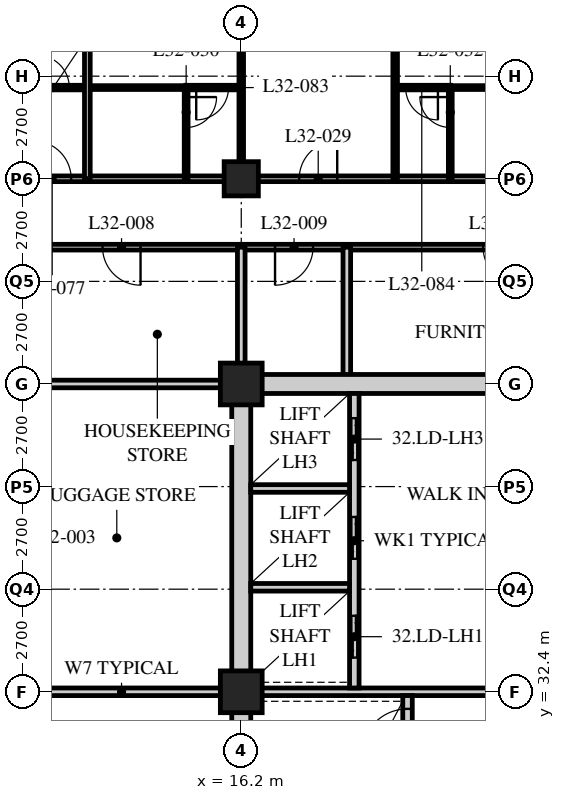
"""IFC4 building model, lengths in metres.
Left out: names, types, materials, properties, quantities, classifications, styles, units other than length and angle.
Written with IfcOpenShell. Run it as: python <this file> out.ifc"""

import sys

from ifc_helpers import new_model, si_unit, direction, frame, frame_2d, origin, origin_2d, place, context, subcontext, project, spatial, rectangle, hollow_rectangle, extrude, element, fill, save


model = new_model("IFC4")
c1 = context("Model", 3, precision=1e-05, world=origin(), true_north=direction((0.0, 1.0)))
c2 = subcontext(c1, "Body", "Model", "MODEL_VIEW")
j1 = project(units=[si_unit("LENGTHUNIT", "METRE"), si_unit("PLANEANGLEUNIT", "RADIAN")], contexts=[c1])
p1 = place(None, origin())
s1 = spatial("IfcSite", under=j1, at=p1, CompositionType="ELEMENT")
p2 = place(p1, origin())
s2 = spatial("IfcBuilding", under=s1, at=p2, CompositionType="ELEMENT")
p3 = place(p2, frame((0.0, 0.0, 127.2)))
s3 = spatial("IfcBuildingStorey", under=s2, at=p3, CompositionType="ELEMENT", Elevation=127.2)
for number, where, z_axis, x_axis in (
    (1, (16.2, 32.4, 0.0), (0.0, 0.0, 1.0), (1.0, 0.0, 0.0)),
    (2, (16.2, 40.5, 0.0), (0.0, 0.0, 1.0), (1.0, 0.0, 0.0)),
):
    element("IfcColumn", number, at=place(p3, frame(where, z_axis=z_axis, x_axis=x_axis)), inside=s3, PredefinedType="COLUMN", context=c2, shape_type="SweptSolid", body=[
        extrude(hollow_rectangle(XDim=1.1, YDim=1.1, WallThickness=0.1, at=origin_2d()), origin(), (0.0, 0.0, 1.0), 3.4),
    ])
p4 = place(p3, frame((16.2, 45.9, 0.0), z_axis=(0.0, 0.0, 1.0), x_axis=(1.0, 0.0, 0.0)))
e3 = element("IfcColumn", 3, at=p4, inside=s3, PredefinedType="COLUMN", context=c2, shape_type="SweptSolid", body=[
    extrude(hollow_rectangle(XDim=0.9, YDim=0.9, WallThickness=0.09, at=origin_2d()), origin(), (0.0, 0.0, 1.0), 3.4),
])
p5 = place(p3, frame((8.1, 45.9, 0.0), z_axis=(0.0, 0.0, 1.0), x_axis=(1.0, 0.0, 0.0)))
e4 = element("IfcWall", 4, at=p5, inside=s3, PredefinedType="PARTITIONING", context=c2, shape_type="SweptSolid", body=[
    extrude(rectangle(XDim=40.5, YDim=0.15, at=frame_2d((20.25, 0.0))), origin(), (0.0, 0.0, 1.0), 2.578),
])
p6 = place(p5, frame((9.625, 0.0, 0.0)))
e5 = element("IfcOpeningElement", 5, at=p6, cuts=e4, PredefinedType="OPENING", context=c2, shape_type="SweptSolid", body=[
    extrude(rectangle(XDim=1.0, YDim=2.1, at=frame_2d((0.5, 1.05))), frame((0.0, 0.085, 0.0), z_axis=(0.0, -1.0, 0.0), x_axis=(1.0, 0.0, 0.0)), (0.0, 0.0, 1.0), 0.17),
])
p7 = place(p5, frame((21.65, 0.0, 0.0)))
e6 = element("IfcOpeningElement", 6, at=p7, cuts=e4, PredefinedType="OPENING", context=c2, shape_type="SweptSolid", body=[
    extrude(rectangle(XDim=1.0, YDim=2.1, at=frame_2d((0.5, 1.05))), frame((0.0, 0.085, 0.0), z_axis=(0.0, -1.0, 0.0), x_axis=(1.0, 0.0, 0.0)), (0.0, 0.0, 1.0), 0.17),
])
p8 = place(p5, frame((26.75, 0.0, 0.0)))
e7 = element("IfcOpeningElement", 7, at=p8, cuts=e4, PredefinedType="OPENING", context=c2, shape_type="SweptSolid", body=[
    extrude(rectangle(XDim=1.0, YDim=2.1, at=frame_2d((0.5, 1.05))), frame((0.0, 0.085, 0.0), z_axis=(0.0, -1.0, 0.0), x_axis=(1.0, 0.0, 0.0)), (0.0, 0.0, 1.0), 0.17),
])
p9 = place(p5, frame((28.95, 0.0, 0.0)))
e8 = element("IfcOpeningElement", 8, at=p9, cuts=e4, PredefinedType="OPENING", context=c2, shape_type="SweptSolid", body=[
    extrude(rectangle(XDim=1.0, YDim=2.1, at=frame_2d((0.5, 1.05))), frame((0.0, 0.085, 0.0), z_axis=(0.0, -1.0, 0.0), x_axis=(1.0, 0.0, 0.0)), (0.0, 0.0, 1.0), 0.17),
])
p10 = place(p5, frame((34.85, 0.0, 0.0)))
e9 = element("IfcOpeningElement", 9, at=p10, cuts=e4, PredefinedType="OPENING", context=c2, shape_type="SweptSolid", body=[
    extrude(rectangle(XDim=1.0, YDim=2.1, at=frame_2d((0.5, 1.05))), frame((0.0, 0.085, 0.0), z_axis=(0.0, -1.0, 0.0), x_axis=(1.0, 0.0, 0.0)), (0.0, 0.0, 1.0), 0.17),
])
p11 = place(p5, frame((36.875, 0.0, 0.0)))
e10 = element("IfcOpeningElement", 10, at=p11, cuts=e4, PredefinedType="OPENING", context=c2, shape_type="SweptSolid", body=[
    extrude(rectangle(XDim=1.0, YDim=2.1, at=frame_2d((0.5, 1.05))), frame((0.0, 0.085, 0.0), z_axis=(0.0, -1.0, 0.0), x_axis=(1.0, 0.0, 0.0)), (0.0, 0.0, 1.0), 0.17),
])
p12 = place(p5, frame((2.625, 0.0, 0.0)))
e11 = element("IfcOpeningElement", 11, at=p12, cuts=e4, PredefinedType="OPENING", context=c2, shape_type="SweptSolid", body=[
    extrude(rectangle(XDim=1.0, YDim=2.1, at=frame_2d((0.5, 1.05))), frame((0.0, 0.085, 0.0), z_axis=(0.0, -1.0, 0.0), x_axis=(1.0, 0.0, 0.0)), (0.0, 0.0, 1.0), 0.17),
])
p13 = place(p3, frame((27.14, 44.1, 0.0), z_axis=(0.0, 0.0, 1.0), x_axis=(-1.0, 0.0, 0.0)))
e12 = element("IfcWall", 12, at=p13, inside=s3, PredefinedType="PARTITIONING", context=c2, shape_type="SweptSolid", body=[
    extrude(rectangle(XDim=17.24, YDim=0.15, at=frame_2d((8.62, 0.0))), origin(), (0.0, 0.0, 1.0), 3.19),
])
p14 = place(p13, frame((13.59, 0.0, 0.0)))
e13 = element("IfcOpeningElement", 13, at=p14, cuts=e12, PredefinedType="OPENING", context=c2, shape_type="SweptSolid", body=[
    extrude(rectangle(XDim=1.0, YDim=2.1, at=frame_2d((0.5, 1.05))), frame((0.0, 0.085, 0.0), z_axis=(0.0, -1.0, 0.0), x_axis=(1.0, 0.0, 0.0)), (0.0, 0.0, 1.0), 0.17),
])
p15 = place(p13, frame((9.051, 0.0, 0.0)))
e14 = element("IfcOpeningElement", 14, at=p15, cuts=e12, PredefinedType="OPENING", context=c2, shape_type="SweptSolid", body=[
    extrude(rectangle(XDim=1.0, YDim=2.1, at=frame_2d((0.5, 1.05))), frame((0.0, 0.085, 0.0), z_axis=(0.0, -1.0, 0.0), x_axis=(1.0, 0.0, 0.0)), (0.0, 0.0, 1.0), 0.17),
])
p16 = place(p13, frame((3.576, 0.0, 0.0)))
e15 = element("IfcOpeningElement", 15, at=p16, cuts=e12, PredefinedType="OPENING", context=c2, shape_type="SweptSolid", body=[
    extrude(rectangle(XDim=1.0, YDim=2.1, at=frame_2d((0.5, 1.05))), frame((0.0, 0.085, 0.0), z_axis=(0.0, -1.0, 0.0), x_axis=(1.0, 0.0, 0.0)), (0.0, 0.0, 1.0), 0.17),
])
p17 = place(p3, frame((9.9, 32.4, 0.0), z_axis=(0.0, 0.0, 1.0), x_axis=(1.0, 0.0, 0.0)))
e16 = element("IfcWall", 16, at=p17, inside=s3, PredefinedType="SOLIDWALL", context=c2, shape_type="SweptSolid", body=[
    extrude(rectangle(XDim=6.3, YDim=0.2, at=frame_2d((3.15, 0.0))), origin(), (0.0, 0.0, 1.0), 3.19),
])
p18 = place(p3, frame((16.2, 40.5, 0.0), z_axis=(0.0, 0.0, 1.0), x_axis=(0.0, 1.0, 0.0)))
e17 = element("IfcWall", 17, at=p18, inside=s3, PredefinedType="SOLIDWALL", context=c2, shape_type="SweptSolid", body=[
    extrude(rectangle(XDim=3.6, YDim=0.2, at=frame_2d((1.8, 0.0))), origin(), (0.0, 0.0, 1.0), 2.578),
])
p19 = place(p3, frame((18.978, 44.1, 0.0), z_axis=(0.0, 0.0, 1.0), x_axis=(0.0, -1.0, 0.0)))
e18 = element("IfcWall", 18, at=p19, inside=s3, PredefinedType="SOLIDWALL", context=c2, shape_type="SweptSolid", body=[
    extrude(rectangle(XDim=3.6, YDim=0.2, at=frame_2d((1.8, 0.0))), origin(), (0.0, 0.0, 1.0), 3.19),
])
p20 = place(p3, frame((9.9, 40.5, 0.0), z_axis=(0.0, 0.0, 1.0), x_axis=(1.0, 0.0, 0.0)))
e19 = element("IfcWall", 19, at=p20, inside=s3, PredefinedType="SOLIDWALL", context=c2, shape_type="SweptSolid", body=[
    extrude(rectangle(XDim=6.3, YDim=0.2, at=frame_2d((3.15, 0.0))), origin(), (0.0, 0.0, 1.0), 3.19),
])
p21 = place(p3, frame((12.15, 48.3, 0.0), z_axis=(0.0, 0.0, 1.0), x_axis=(1.0, 0.0, 0.0)))
e20 = element("IfcWall", 20, at=p21, inside=s3, PredefinedType="PARTITIONING", context=c2, shape_type="SweptSolid", body=[
    extrude(rectangle(XDim=2.6, YDim=0.1, at=frame_2d((1.3, 0.0))), origin(), (0.0, 0.0, 1.0), 3.19),
])
p22 = place(p3, frame((14.75, 45.9, 0.0), z_axis=(0.0, 0.0, 1.0), x_axis=(0.0, 1.0, 0.0)))
e21 = element("IfcWall", 21, at=p22, inside=s3, PredefinedType="PARTITIONING", context=c2, shape_type="SweptSolid", body=[
    extrude(rectangle(XDim=2.4, YDim=0.1, at=frame_2d((1.2, 0.0))), origin(), (0.0, 0.0, 1.0), 3.19),
])
p23 = place(p22, frame((1.35, 0.0, 0.0)))
e22 = element("IfcOpeningElement", 22, at=p23, cuts=e21, PredefinedType="OPENING", context=c2, shape_type="SweptSolid", body=[
    extrude(rectangle(XDim=0.8, YDim=2.1, at=frame_2d((0.4, 1.05))), frame((0.0, 0.06, 0.0), z_axis=(0.0, -1.0, 0.0), x_axis=(1.0, 0.0, 0.0)), (0.0, 0.0, 1.0), 0.12),
])
p24 = place(p3, frame((16.2, 45.9, 0.0), z_axis=(0.0, 0.0, 1.0), x_axis=(0.0, 1.0, 0.0)))
e23 = element("IfcWall", 23, at=p24, inside=s3, PredefinedType="PARTITIONING", context=c2, shape_type="SweptSolid", body=[
    extrude(rectangle(XDim=7.8, YDim=0.12, at=frame_2d((3.9, 0.0))), origin(), (0.0, 0.0, 1.0), 2.578),
])
p25 = place(p24, frame((4.825, 0.0, 0.0)))
e24 = element("IfcOpeningElement", 24, at=p25, cuts=e23, PredefinedType="OPENING", context=c2, shape_type="SweptSolid", body=[
    extrude(rectangle(XDim=0.85, YDim=2.1, at=frame_2d((0.425, 1.05))), frame((0.0, 0.07, 0.0), z_axis=(0.0, -1.0, 0.0), x_axis=(1.0, 0.0, 0.0)), (0.0, 0.0, 1.0), 0.14),
])
p26 = place(p3, frame((21.7, 48.3, 0.0), z_axis=(0.0, 0.0, 1.0), x_axis=(1.0, 0.0, 0.0)))
e25 = element("IfcWall", 25, at=p26, inside=s3, PredefinedType="PARTITIONING", context=c2, shape_type="SweptSolid", body=[
    extrude(rectangle(XDim=7.8, YDim=0.1, at=frame_2d((3.9, 0.0))), origin(), (0.0, 0.0, 1.0), 3.19),
])
p27 = place(p26, frame((3.9, 0.0, 0.0)))
e26 = element("IfcOpeningElement", 26, at=p27, cuts=e25, PredefinedType="OPENING", context=c2, shape_type="SweptSolid", body=[
    extrude(rectangle(XDim=0.8, YDim=2.1, at=frame_2d((0.4, 1.05))), frame((0.0, 0.06, 0.0), z_axis=(0.0, -1.0, 0.0), x_axis=(1.0, 0.0, 0.0)), (0.0, 0.0, 1.0), 0.12),
])
p28 = place(p26, frame((6.5, 0.0, 0.0)))
e27 = element("IfcOpeningElement", 27, at=p28, cuts=e25, PredefinedType="OPENING", context=c2, shape_type="SweptSolid", body=[
    extrude(rectangle(XDim=0.8, YDim=2.1, at=frame_2d((0.4, 1.05))), frame((0.0, 0.06, 0.0), z_axis=(0.0, -1.0, 0.0), x_axis=(1.0, 0.0, 0.0)), (0.0, 0.0, 1.0), 0.12),
])
p29 = place(p3, frame((21.7, 45.9, 0.0), z_axis=(0.0, 0.0, 1.0), x_axis=(0.0, 1.0, 0.0)))
e28 = element("IfcWall", 28, at=p29, inside=s3, PredefinedType="PARTITIONING", context=c2, shape_type="SweptSolid", body=[
    extrude(rectangle(XDim=2.4, YDim=0.1, at=frame_2d((1.2, 0.0))), origin(), (0.0, 0.0, 1.0), 3.19),
])
p30 = place(p29, frame((1.35, 0.0, 0.0)))
e29 = element("IfcOpeningElement", 29, at=p30, cuts=e28, PredefinedType="OPENING", context=c2, shape_type="SweptSolid", body=[
    extrude(rectangle(XDim=0.8, YDim=2.1, at=frame_2d((0.4, 1.05))), frame((0.0, 0.06, 0.0), z_axis=(0.0, -1.0, 0.0), x_axis=(1.0, 0.0, 0.0)), (0.0, 0.0, 1.0), 0.12),
])
p31 = place(p3, frame((20.25, 45.9, 0.0), z_axis=(0.0, 0.0, 1.0), x_axis=(0.0, 1.0, 0.0)))
e30 = element("IfcWall", 30, at=p31, inside=s3, PredefinedType="PARTITIONING", context=c2, shape_type="SweptSolid", body=[
    extrude(rectangle(XDim=7.8, YDim=0.12, at=frame_2d((3.9, 0.0))), origin(), (0.0, 0.0, 1.0), 3.19),
])
p32 = place(p31, frame((4.825, 0.0, 0.0)))
e31 = element("IfcOpeningElement", 31, at=p32, cuts=e30, PredefinedType="OPENING", context=c2, shape_type="SweptSolid", body=[
    extrude(rectangle(XDim=0.85, YDim=2.1, at=frame_2d((0.425, 1.05))), frame((0.0, 0.07, 0.0), z_axis=(0.0, -1.0, 0.0), x_axis=(1.0, 0.0, 0.0)), (0.0, 0.0, 1.0), 0.14),
])
p33 = place(p3, frame((8.1, 48.3, 0.0), z_axis=(0.0, 0.0, 1.0), x_axis=(1.0, 0.0, 0.0)))
e32 = element("IfcWall", 32, at=p33, inside=s3, PredefinedType="PARTITIONING", context=c2, shape_type="SweptSolid", body=[
    extrude(rectangle(XDim=4.05, YDim=0.12, at=frame_2d((2.025, 0.0))), origin(), (0.0, 0.0, 1.0), 3.19),
])
p34 = place(p33, frame((2.725, 0.0, 0.0)))
e33 = element("IfcOpeningElement", 33, at=p34, cuts=e32, PredefinedType="OPENING", context=c2, shape_type="SweptSolid", body=[
    extrude(rectangle(XDim=0.85, YDim=2.1, at=frame_2d((0.425, 1.05))), frame((0.0, 0.07, 0.0), z_axis=(0.0, -1.0, 0.0), x_axis=(1.0, 0.0, 0.0)), (0.0, 0.0, 1.0), 0.14),
])
p35 = place(p3, frame((12.15, 45.9, 0.0), z_axis=(0.0, 0.0, 1.0), x_axis=(0.0, 1.0, 0.0)))
e34 = element("IfcWall", 34, at=p35, inside=s3, PredefinedType="PARTITIONING", context=c2, shape_type="SweptSolid", body=[
    extrude(rectangle(XDim=7.8, YDim=0.15, at=frame_2d((3.9, 0.0))), origin(), (0.0, 0.0, 1.0), 3.19),
])
p36 = place(p3, frame((14.74, 48.3, 0.0), z_axis=(0.0, 0.0, 1.0), x_axis=(1.0, 0.0, 0.0)))
e35 = element("IfcWall", 35, at=p36, inside=s3, PredefinedType="PARTITIONING", context=c2, shape_type="SweptSolid", body=[
    extrude(rectangle(XDim=1.46, YDim=0.12, at=frame_2d((0.73, 0.0))), origin(), (0.0, 0.0, 1.0), 3.19),
])
p37 = place(p36, frame((0.275, 0.0, 0.0)))
e36 = element("IfcOpeningElement", 36, at=p37, cuts=e35, PredefinedType="OPENING", context=c2, shape_type="SweptSolid", body=[
    extrude(rectangle(XDim=0.85, YDim=2.1, at=frame_2d((0.425, 1.05))), frame((0.0, 0.07, 0.0), z_axis=(0.0, -1.0, 0.0), x_axis=(1.0, 0.0, 0.0)), (0.0, 0.0, 1.0), 0.14),
])
p38 = place(p3, frame((20.25, 48.3, 0.0), z_axis=(0.0, 0.0, 1.0), x_axis=(1.0, 0.0, 0.0)))
e37 = element("IfcWall", 37, at=p38, inside=s3, PredefinedType="PARTITIONING", context=c2, shape_type="SweptSolid", body=[
    extrude(rectangle(XDim=1.46, YDim=0.12, at=frame_2d((0.73, 0.0))), origin(), (0.0, 0.0, 1.0), 3.19),
])
p39 = place(p38, frame((0.275, 0.0, 0.0)))
e38 = element("IfcOpeningElement", 38, at=p39, cuts=e37, PredefinedType="OPENING", context=c2, shape_type="SweptSolid", body=[
    extrude(rectangle(XDim=0.85, YDim=2.1, at=frame_2d((0.425, 1.05))), frame((0.0, 0.07, 0.0), z_axis=(0.0, -1.0, 0.0), x_axis=(1.0, 0.0, 0.0)), (0.0, 0.0, 1.0), 0.14),
])
p40 = place(p3, frame((15.95, 40.5, 0.0), z_axis=(0.0, 0.0, 1.0), x_axis=(1.0, 0.0, 0.0)))
e39 = element("IfcWall", 39, at=p40, inside=s3, PredefinedType="SOLIDWALL", context=c2, shape_type="SweptSolid", body=[
    extrude(rectangle(XDim=24.8, YDim=0.5, at=frame_2d((12.4, 0.0))), origin(), (0.0, 0.0, 1.0), 2.54),
])
p41 = place(p40, frame((11.5, 0.0, 0.0)))
e40 = element("IfcOpeningElement", 40, at=p41, cuts=e39, PredefinedType="OPENING", context=c2, shape_type="SweptSolid", body=[
    extrude(rectangle(XDim=1.8, YDim=2.4, at=frame_2d((0.9, 1.2))), frame((0.0, 0.26, 0.0), z_axis=(0.0, -1.0, 0.0), x_axis=(1.0, 0.0, 0.0)), (0.0, 0.0, 1.0), 0.52),
])
p42 = place(p3, frame((16.2, 24.55, 0.0), z_axis=(0.0, 0.0, 1.0), x_axis=(0.0, 1.0, 0.0)))
e41 = element("IfcWall", 41, at=p42, inside=s3, PredefinedType="SOLIDWALL", context=c2, shape_type="SweptSolid", body=[
    extrude(rectangle(XDim=15.7, YDim=0.5, at=frame_2d((7.85, 0.0))), origin(), (0.0, 0.0, 1.0), 2.578),
])
p43 = place(p3, frame((16.45, 32.4, 0.0), z_axis=(0.0, 0.0, 1.0), x_axis=(1.0, 0.0, 0.0)))
e42 = element("IfcWall", 42, at=p43, inside=s3, PredefinedType="SOLIDWALL", context=c2, shape_type="SweptSolid", body=[
    extrude(rectangle(XDim=7.95, YDim=0.2, at=frame_2d((3.975, 0.0))), origin(), (0.0, 0.0, 1.0), 2.578),
])
p44 = place(p3, frame((20.575, 24.55, 0.0), z_axis=(0.0, 0.0, 1.0), x_axis=(0.0, 1.0, 0.0)))
e43 = element("IfcWall", 43, at=p44, inside=s3, PredefinedType="SOLIDWALL", context=c2, shape_type="SweptSolid", body=[
    extrude(rectangle(XDim=7.75, YDim=0.25, at=frame_2d((3.875, 0.0))), origin(), (0.0, 0.0, 1.0), 3.19),
])
p45 = place(p44, frame((6.2, 0.0, 0.0)))
e44 = element("IfcOpeningElement", 44, at=p45, cuts=e43, PredefinedType="OPENING", context=c2, shape_type="SweptSolid", body=[
    extrude(rectangle(XDim=1.2, YDim=2.1, at=frame_2d((0.6, 1.05))), frame((0.0, 0.135, 0.0), z_axis=(0.0, -1.0, 0.0), x_axis=(1.0, 0.0, 0.0)), (0.0, 0.0, 1.0), 0.27),
])
p46 = place(p3, frame((19.175, 32.5, 0.0), z_axis=(0.0, 0.0, 1.0), x_axis=(0.0, 1.0, 0.0)))
e45 = element("IfcWall", 45, at=p46, inside=s3, PredefinedType="SOLIDWALL", context=c2, shape_type="SweptSolid", body=[
    extrude(rectangle(XDim=7.75, YDim=0.25, at=frame_2d((3.875, 0.0))), origin(), (0.0, 0.0, 1.0), 3.19),
])
p47 = place(p46, frame((0.8, 0.0, 0.0)))
e46 = element("IfcOpeningElement", 46, at=p47, cuts=e45, PredefinedType="OPENING", context=c2, shape_type="SweptSolid", body=[
    extrude(rectangle(XDim=1.1, YDim=2.4, at=frame_2d((0.55, 1.2))), frame((0.0, 0.135, 0.0), z_axis=(0.0, -1.0, 0.0), x_axis=(1.0, 0.0, 0.0)), (0.0, 0.0, 1.0), 0.27),
])
p48 = place(p46, frame((3.4, 0.0, 0.0)))
e47 = element("IfcOpeningElement", 47, at=p48, cuts=e45, PredefinedType="OPENING", context=c2, shape_type="SweptSolid", body=[
    extrude(rectangle(XDim=1.1, YDim=2.4, at=frame_2d((0.55, 1.2))), frame((0.0, 0.135, 0.0), z_axis=(0.0, -1.0, 0.0), x_axis=(1.0, 0.0, 0.0)), (0.0, 0.0, 1.0), 0.27),
])
p49 = place(p46, frame((6.0, 0.0, 0.0)))
e48 = element("IfcOpeningElement", 48, at=p49, cuts=e45, PredefinedType="OPENING", context=c2, shape_type="SweptSolid", body=[
    extrude(rectangle(XDim=1.1, YDim=2.4, at=frame_2d((0.55, 1.2))), frame((0.0, 0.135, 0.0), z_axis=(0.0, -1.0, 0.0), x_axis=(1.0, 0.0, 0.0)), (0.0, 0.0, 1.0), 0.27),
])
for number, where, z_axis, x_axis in (
    (49, (16.45, 35.15, 0.0), (0.0, 0.0, 1.0), (1.0, 0.0, 0.0)),
    (50, (16.45, 37.75, 0.0), (0.0, 0.0, 1.0), (1.0, 0.0, 0.0)),
):
    element("IfcWall", number, at=place(p3, frame(where, z_axis=z_axis, x_axis=x_axis)), inside=s3, PredefinedType="SOLIDWALL", context=c2, shape_type="SweptSolid", body=[
        extrude(rectangle(XDim=2.6, YDim=0.2, at=frame_2d((1.3, 0.0))), origin(), (0.0, 0.0, 1.0), 3.19),
    ])
p50 = place(p14, origin())
e51 = element("IfcDoor", 51, at=p50, inside=s3, OperationType="SINGLE_SWING_LEFT", PredefinedType="DOOR", context=c2, shape_type="SweptSolid", body=[
    extrude(rectangle(XDim=1.0, YDim=2.1, at=frame_2d((0.5, 1.05))), frame((0.0, 0.025, 0.0), z_axis=(0.0, -1.0, 0.0), x_axis=(1.0, 0.0, 0.0)), (0.0, 0.0, 1.0), 0.05),
])
fill(e13, e51)
p51 = place(p15, origin())
e52 = element("IfcDoor", 52, at=p51, inside=s3, OperationType="SINGLE_SWING_RIGHT", PredefinedType="DOOR", context=c2, shape_type="SweptSolid", body=[
    extrude(rectangle(XDim=1.0, YDim=2.1, at=frame_2d((0.5, 1.05))), frame((0.0, 0.025, 0.0), z_axis=(0.0, -1.0, 0.0), x_axis=(1.0, 0.0, 0.0)), (0.0, 0.0, 1.0), 0.05),
])
fill(e14, e52)
p52 = place(p16, origin())
e53 = element("IfcDoor", 53, at=p52, inside=s3, OperationType="SINGLE_SWING_LEFT", PredefinedType="DOOR", context=c2, shape_type="SweptSolid", body=[
    extrude(rectangle(XDim=1.0, YDim=2.1, at=frame_2d((0.5, 1.05))), frame((0.0, 0.025, 0.0), z_axis=(0.0, -1.0, 0.0), x_axis=(1.0, 0.0, 0.0)), (0.0, 0.0, 1.0), 0.05),
])
fill(e15, e53)
p53 = place(p6, origin())
e54 = element("IfcDoor", 54, at=p53, inside=s3, OperationType="SINGLE_SWING_RIGHT", PredefinedType="DOOR", context=c2, shape_type="SweptSolid", body=[
    extrude(rectangle(XDim=1.0, YDim=2.1, at=frame_2d((0.5, 1.05))), frame((0.0, 0.025, 0.0), z_axis=(0.0, -1.0, 0.0), x_axis=(1.0, 0.0, 0.0)), (0.0, 0.0, 1.0), 0.05),
])
fill(e5, e54)
p54 = place(p23, origin())
e55 = element("IfcDoor", 55, at=p54, inside=s3, OperationType="SINGLE_SWING_LEFT", PredefinedType="DOOR", context=c2, shape_type="SweptSolid", body=[
    extrude(rectangle(XDim=0.8, YDim=2.1, at=frame_2d((0.4, 1.05))), frame((0.0, 0.025, 0.0), z_axis=(0.0, -1.0, 0.0), x_axis=(1.0, 0.0, 0.0)), (0.0, 0.0, 1.0), 0.05),
])
fill(e22, e55)
p55 = place(p30, origin())
e56 = element("IfcDoor", 56, at=p55, inside=s3, OperationType="SINGLE_SWING_RIGHT", PredefinedType="DOOR", context=c2, shape_type="SweptSolid", body=[
    extrude(rectangle(XDim=0.8, YDim=2.1, at=frame_2d((0.4, 1.05))), frame((0.0, 0.025, 0.0), z_axis=(0.0, -1.0, 0.0), x_axis=(1.0, 0.0, 0.0)), (0.0, 0.0, 1.0), 0.05),
])
fill(e29, e56)
p56 = place(p12, origin())
e57 = element("IfcDoor", 57, at=p56, inside=s3, OperationType="SINGLE_SWING_LEFT", PredefinedType="DOOR", context=c2, shape_type="SweptSolid", body=[
    extrude(rectangle(XDim=1.0, YDim=2.1, at=frame_2d((0.5, 1.05))), frame((0.0, 0.025, 0.0), z_axis=(0.0, -1.0, 0.0), x_axis=(1.0, 0.0, 0.0)), (0.0, 0.0, 1.0), 0.05),
])
fill(e11, e57)
p57 = place(p34, origin())
e58 = element("IfcDoor", 58, at=p57, inside=s3, OperationType="SINGLE_SWING_LEFT", PredefinedType="DOOR", context=c2, shape_type="SweptSolid", body=[
    extrude(rectangle(XDim=0.85, YDim=2.1, at=frame_2d((0.425, 1.05))), frame((0.0, 0.025, 0.0), z_axis=(0.0, -1.0, 0.0), x_axis=(1.0, 0.0, 0.0)), (0.0, 0.0, 1.0), 0.05),
])
fill(e33, e58)
p58 = place(p37, origin())
e59 = element("IfcDoor", 59, at=p58, inside=s3, OperationType="SINGLE_SWING_RIGHT", PredefinedType="DOOR", context=c2, shape_type="SweptSolid", body=[
    extrude(rectangle(XDim=0.85, YDim=2.1, at=frame_2d((0.425, 1.05))), frame((0.0, 0.025, 0.0), z_axis=(0.0, -1.0, 0.0), x_axis=(1.0, 0.0, 0.0)), (0.0, 0.0, 1.0), 0.05),
])
fill(e36, e59)
p59 = place(p39, origin())
e60 = element("IfcDoor", 60, at=p59, inside=s3, OperationType="SINGLE_SWING_LEFT", PredefinedType="DOOR", context=c2, shape_type="SweptSolid", body=[
    extrude(rectangle(XDim=0.85, YDim=2.1, at=frame_2d((0.425, 1.05))), frame((0.0, 0.025, 0.0), z_axis=(0.0, -1.0, 0.0), x_axis=(1.0, 0.0, 0.0)), (0.0, 0.0, 1.0), 0.05),
])
fill(e38, e60)
p60 = place(p45, origin())
e61 = element("IfcDoor", 61, at=p60, inside=s3, OperationType="SINGLE_SWING_LEFT", PredefinedType="DOOR", context=c2, shape_type="SweptSolid", body=[
    extrude(rectangle(XDim=1.2, YDim=2.1, at=frame_2d((0.6, 1.05))), frame((0.0, 0.025, 0.0), z_axis=(0.0, -1.0, 0.0), x_axis=(1.0, 0.0, 0.0)), (0.0, 0.0, 1.0), 0.05),
])
fill(e44, e61)
p61 = place(p47, origin())
e62 = element("IfcDoor", 62, at=p61, inside=s3, OperationType="DOUBLE_DOOR_SLIDING", PredefinedType="DOOR", context=c2, shape_type="SweptSolid", body=[
    extrude(rectangle(XDim=1.1, YDim=2.4, at=frame_2d((0.55, 1.2))), frame((0.0, 0.025, 0.0), z_axis=(0.0, -1.0, 0.0), x_axis=(1.0, 0.0, 0.0)), (0.0, 0.0, 1.0), 0.05),
])
fill(e46, e62)
p62 = place(p48, origin())
e63 = element("IfcDoor", 63, at=p62, inside=s3, OperationType="DOUBLE_DOOR_SLIDING", PredefinedType="DOOR", context=c2, shape_type="SweptSolid", body=[
    extrude(rectangle(XDim=1.1, YDim=2.4, at=frame_2d((0.55, 1.2))), frame((0.0, 0.025, 0.0), z_axis=(0.0, -1.0, 0.0), x_axis=(1.0, 0.0, 0.0)), (0.0, 0.0, 1.0), 0.05),
])
fill(e47, e63)
p63 = place(p49, origin())
e64 = element("IfcDoor", 64, at=p63, inside=s3, OperationType="DOUBLE_DOOR_SLIDING", PredefinedType="DOOR", context=c2, shape_type="SweptSolid", body=[
    extrude(rectangle(XDim=1.1, YDim=2.4, at=frame_2d((0.55, 1.2))), frame((0.0, 0.025, 0.0), z_axis=(0.0, -1.0, 0.0), x_axis=(1.0, 0.0, 0.0)), (0.0, 0.0, 1.0), 0.05),
])
fill(e48, e64)
save(model, sys.argv[1])
